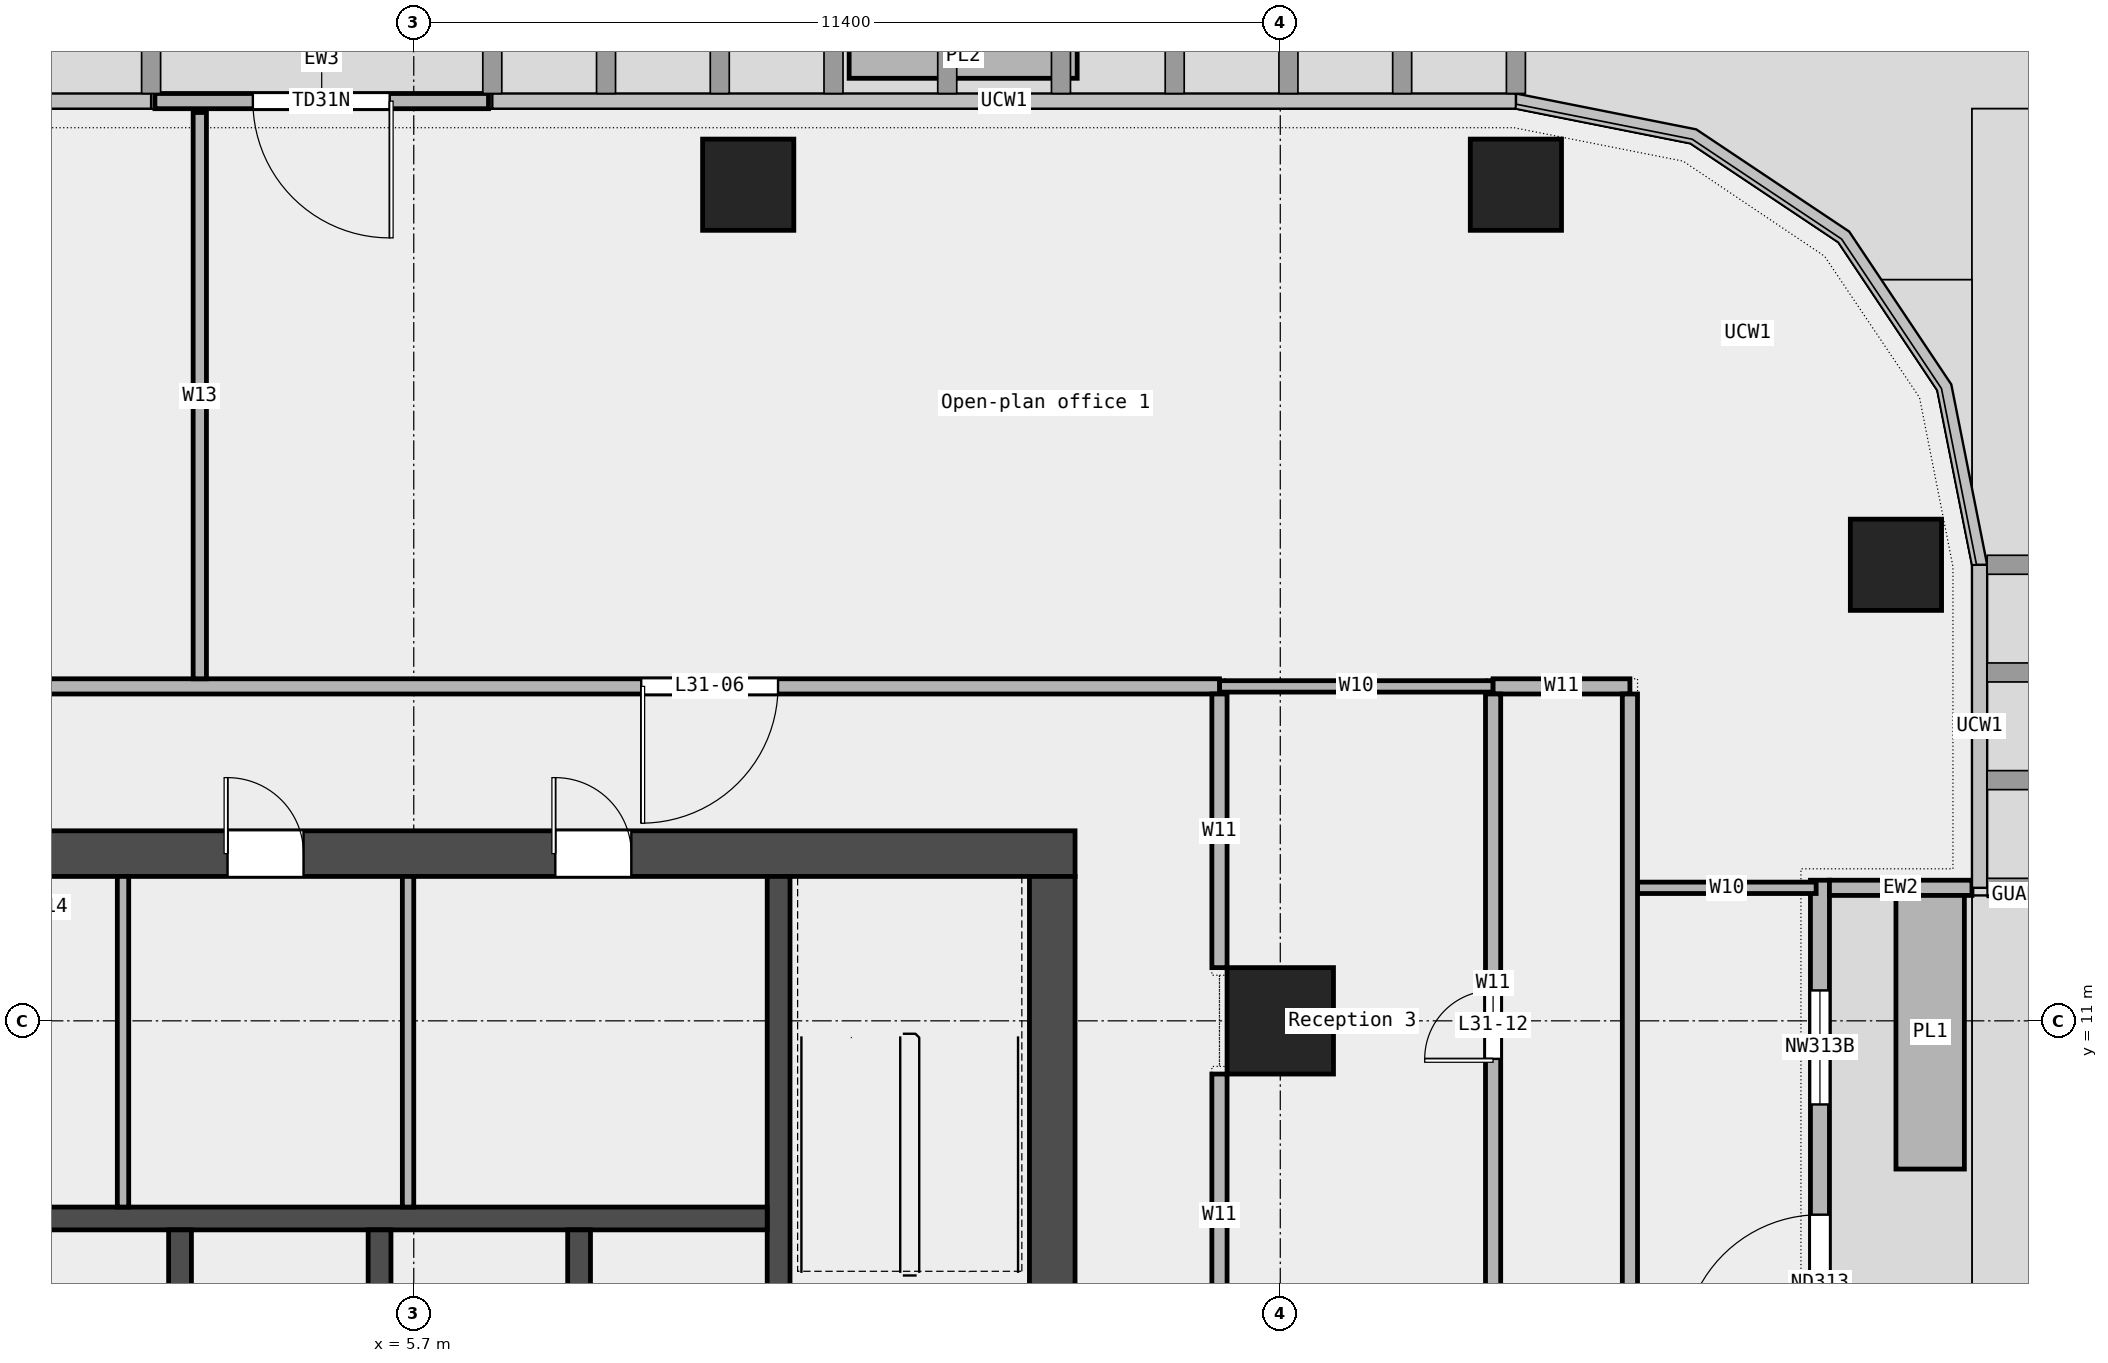
"""IFC4 building model, lengths in metres.
Left out: names, types, materials, properties, quantities, classifications, styles, units other than length and angle.
Written with IfcOpenShell. Run it as: python <this file> out.ifc"""

import sys

from ifc_helpers import new_model, si_unit, direction, frame, frame_2d, origin, origin_2d, place, context, subcontext, project, spatial, rectangle, extrude, element, fill, save


model = new_model("IFC4")
c1 = context("Model", 3, precision=1e-05, world=origin(), true_north=direction((0.0, 1.0)))
c2 = subcontext(c1, "Body", "Model", "MODEL_VIEW")
j1 = project(units=[si_unit("LENGTHUNIT", "METRE"), si_unit("PLANEANGLEUNIT", "RADIAN")], contexts=[c1])
p1 = place(None, origin())
s1 = spatial("IfcSite", under=j1, at=p1, CompositionType="ELEMENT")
p2 = place(p1, origin())
s2 = spatial("IfcBuilding", under=s1, at=p2, CompositionType="ELEMENT")
p3 = place(p2, frame((0.0, 0.0, 157.0)))
s3 = spatial("IfcBuildingStorey", under=s2, at=p3, CompositionType="ELEMENT", Elevation=157.0)
for number, where, z_axis, x_axis in (
    (1, (25.2, 17.0, 0.0), (0.0, 0.0, 1.0), (1.0, 0.0, 0.0)),
    (2, (20.2, 22.0, 0.0), (0.0, 0.0, 1.0), (1.0, 0.0, 0.0)),
    (3, (10.1, 22.0, 0.0), (0.0, 0.0, 1.0), (1.0, 0.0, 0.0)),
):
    element("IfcColumn", number, at=place(p3, frame(where, z_axis=z_axis, x_axis=x_axis)), inside=s3, PredefinedType="COLUMN", context=c2, shape_type="SweptSolid", body=[
        extrude(rectangle(XDim=1.2, YDim=1.2, at=origin_2d()), origin(), (0.0, 0.0, 1.0), 3.6),
    ])
p4 = place(p3, frame((17.1, 11.0, 0.0), z_axis=(0.0, 0.0, 1.0), x_axis=(1.0, 0.0, 0.0)))
e4 = element("IfcColumn", 4, at=p4, inside=s3, PredefinedType="COLUMN", context=c2, shape_type="SweptSolid", body=[
    extrude(rectangle(XDim=1.4, YDim=1.4, at=origin_2d()), origin(), (0.0, 0.0, 1.0), 3.6),
])
p5 = place(p3, frame((24.2, -0.1, 0.0), z_axis=(0.0, 0.0, 1.0), x_axis=(0.0, 1.0, 0.0)))
e5 = element("IfcWall", 5, at=p5, inside=s3, PredefinedType="STANDARD", context=c2, shape_type="SweptSolid", body=[
    extrude(rectangle(XDim=12.95, YDim=0.25, at=frame_2d((6.475, 0.0))), origin(), (0.0, 0.0, 1.0), 3.6),
])
p6 = place(p5, frame((1.5, 0.0, 0.45)))
e6 = element("IfcOpeningElement", 6, at=p6, cuts=e5, PredefinedType="OPENING", context=c2, shape_type="SweptSolid", body=[
    extrude(rectangle(XDim=1.5, YDim=2.4, at=frame_2d((0.75, 1.2))), frame((0.0, 0.137, 0.0), z_axis=(0.0, -1.0, 0.0), x_axis=(1.0, 0.0, 0.0)), (0.0, 0.0, 1.0), 0.274),
])
p7 = place(p5, frame((6.75, 0.0, 0.0)))
e7 = element("IfcOpeningElement", 7, at=p7, cuts=e5, PredefinedType="OPENING", context=c2, shape_type="SweptSolid", body=[
    extrude(rectangle(XDim=1.8, YDim=2.4, at=frame_2d((0.9, 1.2))), frame((0.0, 0.137, 0.0), z_axis=(0.0, -1.0, 0.0), x_axis=(1.0, 0.0, 0.0)), (0.0, 0.0, 1.0), 0.274),
])
p8 = place(p5, frame((10.0, 0.0, 0.45)))
e8 = element("IfcOpeningElement", 8, at=p8, cuts=e5, PredefinedType="OPENING", context=c2, shape_type="SweptSolid", body=[
    extrude(rectangle(XDim=1.5, YDim=2.4, at=frame_2d((0.75, 1.2))), frame((0.0, 0.137, 0.0), z_axis=(0.0, -1.0, 0.0), x_axis=(1.0, 0.0, 0.0)), (0.0, 0.0, 1.0), 0.274),
])
p9 = place(p3, frame((26.2, 12.75, 0.0), z_axis=(0.0, 0.0, 1.0), x_axis=(-1.0, 0.0, 0.0)))
e9 = element("IfcWall", 9, at=p9, inside=s3, PredefinedType="STANDARD", context=c2, shape_type="SweptSolid", body=[
    extrude(rectangle(XDim=1.875, YDim=0.2, at=frame_2d((0.938, 0.0))), origin(), (0.0, 0.0, 1.0), 3.6),
])
p10 = place(p3, frame((25.65, 9.05, 0.0), z_axis=(0.0, 0.0, 1.0), x_axis=(0.0, 1.0, 0.0)))
e10 = element("IfcWall", 10, at=p10, inside=s3, PredefinedType="STANDARD", context=c2, shape_type="SweptSolid", body=[
    extrude(rectangle(XDim=3.6, YDim=0.9, at=frame_2d((1.8, 0.0))), origin(), (0.0, 0.0, 1.0), 0.7),
])
p11 = place(p3, frame((6.683, 23.1, 0.0), z_axis=(0.0, 0.0, 1.0), x_axis=(-1.0, 0.0, 0.0)))
e11 = element("IfcWall", 11, at=p11, inside=s3, PredefinedType="STANDARD", context=c2, shape_type="SweptSolid", body=[
    extrude(rectangle(XDim=4.389, YDim=0.2, at=frame_2d((2.194, 0.0))), origin(), (0.0, 0.0, 1.0), 3.6),
])
p12 = place(p11, frame((1.3, 0.0, 0.0)))
e12 = element("IfcOpeningElement", 12, at=p12, cuts=e11, PredefinedType="OPENING", context=c2, shape_type="SweptSolid", body=[
    extrude(rectangle(XDim=1.8, YDim=2.4, at=frame_2d((0.9, 1.2))), frame((0.0, 0.112, 0.0), z_axis=(0.0, -1.0, 0.0), x_axis=(1.0, 0.0, 0.0)), (0.0, 0.0, 1.0), 0.224),
])
p13 = place(p3, frame((14.428, 23.7, 0.0), z_axis=(0.0, 0.0, 1.0), x_axis=(-1.0, 0.0, 0.0)))
e13 = element("IfcWall", 13, at=p13, inside=s3, PredefinedType="STANDARD", context=c2, shape_type="SweptSolid", body=[
    extrude(rectangle(XDim=3.0, YDim=0.6, at=frame_2d((1.5, 0.0))), origin(), (0.0, 0.0, 1.0), 0.7),
])
p14 = place(p3, frame((21.8, 12.75, 0.0), z_axis=(0.0, 0.0, 1.0), x_axis=(1.0, 0.0, 0.0)))
e14 = element("IfcWall", 14, at=p14, inside=s3, PredefinedType="PARTITIONING", context=c2, shape_type="SweptSolid", body=[
    extrude(rectangle(XDim=2.35, YDim=0.15, at=frame_2d((1.175, 0.0))), origin(), (0.0, 0.0, 1.0), 3.6),
])
p15 = place(p3, frame((16.3, 15.4, 0.0), z_axis=(0.0, 0.0, 1.0), x_axis=(1.0, 0.0, 0.0)))
e15 = element("IfcWall", 15, at=p15, inside=s3, PredefinedType="PARTITIONING", context=c2, shape_type="SweptSolid", body=[
    extrude(rectangle(XDim=3.6, YDim=0.15, at=frame_2d((1.8, 0.0))), origin(), (0.0, 0.0, 1.0), 3.6),
])
p16 = place(p3, frame((-16.3, 15.4, 0.0), z_axis=(0.0, 0.0, 1.0), x_axis=(1.0, 0.0, 0.0)))
e16 = element("IfcWall", 16, at=p16, inside=s3, PredefinedType="PARTITIONING", context=c2, shape_type="SweptSolid", body=[
    extrude(rectangle(XDim=32.6, YDim=0.2, at=frame_2d((16.3, 0.0))), origin(), (0.0, 0.0, 1.0), 3.6),
])
p17 = place(p16, frame((24.992, 0.0, 0.0)))
e17 = element("IfcOpeningElement", 17, at=p17, cuts=e16, PredefinedType="OPENING", context=c2, shape_type="SweptSolid", body=[
    extrude(rectangle(XDim=1.8, YDim=2.1, at=frame_2d((0.9, 1.05))), frame((0.0, 0.112, 0.0), z_axis=(0.0, -1.0, 0.0), x_axis=(1.0, 0.0, 0.0)), (0.0, 0.0, 1.0), 0.224),
])
p18 = place(p16, frame((9.635, 0.0, 0.0)))
e18 = element("IfcOpeningElement", 18, at=p18, cuts=e16, PredefinedType="OPENING", context=c2, shape_type="SweptSolid", body=[
    extrude(rectangle(XDim=1.8, YDim=2.1, at=frame_2d((0.9, 1.05))), frame((0.0, 0.112, 0.0), z_axis=(0.0, -1.0, 0.0), x_axis=(1.0, 0.0, 0.0)), (0.0, 0.0, 1.0), 0.224),
])
p19 = place(p3, frame((19.9, 15.4, 0.0), z_axis=(0.0, 0.0, 1.0), x_axis=(1.0, 0.0, 0.0)))
e19 = element("IfcWall", 19, at=p19, inside=s3, PredefinedType="PARTITIONING", context=c2, shape_type="SweptSolid", body=[
    extrude(rectangle(XDim=1.8, YDim=0.2, at=frame_2d((0.9, 0.0))), origin(), (0.0, 0.0, 1.0), 3.6),
])
p20 = place(p3, frame((2.885, 15.5, 0.0), z_axis=(0.0, 0.0, 1.0), x_axis=(0.0, 1.0, 0.0)))
e20 = element("IfcWall", 20, at=p20, inside=s3, PredefinedType="PARTITIONING", context=c2, shape_type="SweptSolid", body=[
    extrude(rectangle(XDim=7.45, YDim=0.175, at=frame_2d((3.725, 0.0))), origin(), (0.0, 0.0, 1.0), 3.6),
])
p21 = place(p3, frame((16.3, 6.6, 0.0), z_axis=(0.0, 0.0, 1.0), x_axis=(0.0, 1.0, 0.0)))
e21 = element("IfcWall", 21, at=p21, inside=s3, PredefinedType="PARTITIONING", context=c2, shape_type="SweptSolid", body=[
    extrude(rectangle(XDim=3.7, YDim=0.2, at=frame_2d((1.85, 0.0))), origin(), (0.0, 0.0, 1.0), 3.6),
])
p22 = place(p3, frame((16.3, 11.7, 0.0), z_axis=(0.0, 0.0, 1.0), x_axis=(0.0, 1.0, 0.0)))
e22 = element("IfcWall", 22, at=p22, inside=s3, PredefinedType="PARTITIONING", context=c2, shape_type="SweptSolid", body=[
    extrude(rectangle(XDim=3.6, YDim=0.2, at=frame_2d((1.8, 0.0))), origin(), (0.0, 0.0, 1.0), 3.6),
])
p23 = place(p3, frame((19.9, 6.6, 0.0), z_axis=(0.0, 0.0, 1.0), x_axis=(0.0, 1.0, 0.0)))
e23 = element("IfcWall", 23, at=p23, inside=s3, PredefinedType="PARTITIONING", context=c2, shape_type="SweptSolid", body=[
    extrude(rectangle(XDim=8.7, YDim=0.2, at=frame_2d((4.35, 0.0))), origin(), (0.0, 0.0, 1.0), 3.6),
])
p24 = place(p23, frame((3.9, 0.0, 0.0)))
e24 = element("IfcOpeningElement", 24, at=p24, cuts=e23, PredefinedType="OPENING", context=c2, shape_type="SweptSolid", body=[
    extrude(rectangle(XDim=0.9, YDim=2.1, at=frame_2d((0.45, 1.05))), frame((0.0, 0.112, 0.0), z_axis=(0.0, -1.0, 0.0), x_axis=(1.0, 0.0, 0.0)), (0.0, 0.0, 1.0), 0.224),
])
p25 = place(p3, frame((21.7, -9.0, 0.0), z_axis=(0.0, 0.0, 1.0), x_axis=(0.0, 1.0, 0.0)))
e25 = element("IfcWall", 25, at=p25, inside=s3, PredefinedType="PARTITIONING", context=c2, shape_type="SweptSolid", body=[
    extrude(rectangle(XDim=24.3, YDim=0.2, at=frame_2d((12.15, 0.0))), origin(), (0.0, 0.0, 1.0), 3.6),
])
p26 = place(p25, frame((14.925, 0.0, 0.0)))
e26 = element("IfcOpeningElement", 26, at=p26, cuts=e25, PredefinedType="OPENING", context=c2, shape_type="SweptSolid", body=[
    extrude(rectangle(XDim=0.9, YDim=2.1, at=frame_2d((0.45, 1.05))), frame((0.0, 0.112, 0.0), z_axis=(0.0, -1.0, 0.0), x_axis=(1.0, 0.0, 0.0)), (0.0, 0.0, 1.0), 0.224),
])
p27 = place(p25, frame((2.562, 0.0, 0.0)))
e27 = element("IfcOpeningElement", 27, at=p27, cuts=e25, PredefinedType="OPENING", context=c2, shape_type="SweptSolid", body=[
    extrude(rectangle(XDim=0.9, YDim=2.1, at=frame_2d((0.45, 1.05))), frame((0.0, 0.112, 0.0), z_axis=(0.0, -1.0, 0.0), x_axis=(1.0, 0.0, 0.0)), (0.0, 0.0, 1.0), 0.224),
])
p28 = place(p3, frame((-14.4, 13.2, 0.0), z_axis=(0.0, 0.0, 1.0), x_axis=(1.0, 0.0, 0.0)))
e28 = element("IfcWall", 28, at=p28, inside=s3, PredefinedType="SHEAR", context=c2, shape_type="SweptSolid", body=[
    extrude(rectangle(XDim=28.8, YDim=0.6, at=frame_2d((14.4, 0.0))), origin(), (0.0, 0.0, 1.0), 3.7),
])
p29 = place(p28, frame((4.9, 0.0, 0.0)))
e29 = element("IfcOpeningElement", 29, at=p29, cuts=e28, PredefinedType="OPENING", context=c2, shape_type="SweptSolid", body=[
    extrude(rectangle(XDim=1.0, YDim=2.1, at=frame_2d((0.5, 1.05))), frame((0.0, 0.312, 0.0), z_axis=(0.0, -1.0, 0.0), x_axis=(1.0, 0.0, 0.0)), (0.0, 0.0, 1.0), 0.624),
])
p30 = place(p28, frame((8.087, 0.0, 0.0)))
e30 = element("IfcOpeningElement", 30, at=p30, cuts=e28, PredefinedType="OPENING", context=c2, shape_type="SweptSolid", body=[
    extrude(rectangle(XDim=1.0, YDim=2.1, at=frame_2d((0.5, 1.05))), frame((0.0, 0.312, 0.0), z_axis=(0.0, -1.0, 0.0), x_axis=(1.0, 0.0, 0.0)), (0.0, 0.0, 1.0), 0.624),
])
p31 = place(p28, frame((12.775, 0.0, 0.0)))
e31 = element("IfcOpeningElement", 31, at=p31, cuts=e28, PredefinedType="OPENING", context=c2, shape_type="SweptSolid", body=[
    extrude(rectangle(XDim=1.0, YDim=2.1, at=frame_2d((0.5, 1.05))), frame((0.0, 0.312, 0.0), z_axis=(0.0, -1.0, 0.0), x_axis=(1.0, 0.0, 0.0)), (0.0, 0.0, 1.0), 0.624),
])
p32 = place(p28, frame((17.65, 0.0, 0.0)))
e32 = element("IfcOpeningElement", 32, at=p32, cuts=e28, PredefinedType="OPENING", context=c2, shape_type="SweptSolid", body=[
    extrude(rectangle(XDim=1.0, YDim=2.1, at=frame_2d((0.5, 1.05))), frame((0.0, 0.312, 0.0), z_axis=(0.0, -1.0, 0.0), x_axis=(1.0, 0.0, 0.0)), (0.0, 0.0, 1.0), 0.624),
])
p33 = place(p28, frame((21.962, 0.0, 0.0)))
e33 = element("IfcOpeningElement", 33, at=p33, cuts=e28, PredefinedType="OPENING", context=c2, shape_type="SweptSolid", body=[
    extrude(rectangle(XDim=1.0, YDim=2.1, at=frame_2d((0.5, 1.05))), frame((0.0, 0.312, 0.0), z_axis=(0.0, -1.0, 0.0), x_axis=(1.0, 0.0, 0.0)), (0.0, 0.0, 1.0), 0.624),
])
p34 = place(p3, frame((14.1, -6.6, 0.0), z_axis=(0.0, 0.0, 1.0), x_axis=(0.0, 1.0, 0.0)))
e34 = element("IfcWall", 34, at=p34, inside=s3, PredefinedType="SHEAR", context=c2, shape_type="SweptSolid", body=[
    extrude(rectangle(XDim=19.5, YDim=0.6, at=frame_2d((9.75, 0.0))), origin(), (0.0, 0.0, 1.0), 3.7),
])
p35 = place(p34, frame((9.3, 0.0, 0.0)))
e35 = element("IfcOpeningElement", 35, at=p35, cuts=e34, PredefinedType="OPENING", context=c2, shape_type="SweptSolid", body=[
    extrude(rectangle(XDim=1.8, YDim=2.1, at=frame_2d((0.9, 1.05))), frame((0.0, 0.312, 0.0), z_axis=(0.0, -1.0, 0.0), x_axis=(1.0, 0.0, 0.0)), (0.0, 0.0, 1.0), 0.624),
])
p36 = place(p3, frame((10.5, 5.25, 0.0), z_axis=(0.0, 0.0, 1.0), x_axis=(0.0, 1.0, 0.0)))
e36 = element("IfcWall", 36, at=p36, inside=s3, PredefinedType="SHEAR", context=c2, shape_type="SweptSolid", body=[
    extrude(rectangle(XDim=7.65, YDim=0.3, at=frame_2d((3.825, 0.0))), origin(), (0.0, 0.0, 1.0), 3.7),
])
p37 = place(p3, frame((-10.35, 8.4, 0.0), z_axis=(0.0, 0.0, 1.0), x_axis=(1.0, 0.0, 0.0)))
e37 = element("IfcWall", 37, at=p37, inside=s3, PredefinedType="SOLIDWALL", context=c2, shape_type="SweptSolid", body=[
    extrude(rectangle(XDim=20.7, YDim=0.3, at=frame_2d((10.35, 0.0))), origin(), (0.0, 0.0, 1.0), 3.7),
])
for number, where, z_axis, x_axis in (
    (38, (2.625, 5.55, 0.0), (0.0, 0.0, 1.0), (0.0, 1.0, 0.0)),
    (39, (5.25, 5.55, 0.0), (0.0, 0.0, 1.0), (0.0, 1.0, 0.0)),
    (40, (7.875, 5.55, 0.0), (0.0, 0.0, 1.0), (0.0, 1.0, 0.0)),
):
    element("IfcWall", number, at=place(p3, frame(where, z_axis=z_axis, x_axis=x_axis)), inside=s3, PredefinedType="SOLIDWALL", context=c2, shape_type="SweptSolid", body=[
        extrude(rectangle(XDim=2.7, YDim=0.3, at=frame_2d((1.35, 0.0))), origin(), (0.0, 0.0, 1.0), 3.7),
    ])
for number, where, z_axis, x_axis in (
    (41, (1.875, 8.55, 0.0), (0.0, 0.0, 1.0), (0.0, 1.0, 0.0)),
    (42, (5.625, 8.55, 0.0), (0.0, 0.0, 1.0), (0.0, 1.0, 0.0)),
):
    element("IfcWall", number, at=place(p3, frame(where, z_axis=z_axis, x_axis=x_axis)), inside=s3, PredefinedType="PARTITIONING", context=c2, shape_type="SweptSolid", body=[
        extrude(rectangle(XDim=4.35, YDim=0.15, at=frame_2d((2.175, 0.0))), origin(), (0.0, 0.0, 1.0), 3.7),
    ])
p38 = place(p7, origin())
e43 = element("IfcDoor", 43, at=p38, inside=s3, OperationType="DOUBLE_DOOR_SINGLE_SWING", PredefinedType="DOOR", context=c2, shape_type="SweptSolid", body=[
    extrude(rectangle(XDim=1.8, YDim=2.4, at=frame_2d((0.9, 1.2))), frame((0.0, 0.025, 0.0), z_axis=(0.0, -1.0, 0.0), x_axis=(1.0, 0.0, 0.0)), (0.0, 0.0, 1.0), 0.05),
])
fill(e7, e43)
p39 = place(p8, origin())
e44 = element("IfcWindow", 44, at=p39, inside=s3, PartitioningType="SINGLE_PANEL", PredefinedType="WINDOW", context=c2, shape_type="SweptSolid", body=[
    extrude(rectangle(XDim=1.5, YDim=2.4, at=frame_2d((0.75, 1.2))), frame((0.0, 0.03, 0.0), z_axis=(0.0, -1.0, 0.0), x_axis=(1.0, 0.0, 0.0)), (0.0, 0.0, 1.0), 0.06),
])
fill(e8, e44)
p40 = place(p12, origin())
e45 = element("IfcDoor", 45, at=p40, inside=s3, OperationType="DOUBLE_DOOR_SINGLE_SWING", PredefinedType="DOOR", context=c2, shape_type="SweptSolid", body=[
    extrude(rectangle(XDim=1.8, YDim=2.4, at=frame_2d((0.9, 1.2))), frame((0.0, 0.025, 0.0), z_axis=(0.0, -1.0, 0.0), x_axis=(1.0, 0.0, 0.0)), (0.0, 0.0, 1.0), 0.05),
])
fill(e12, e45)
p41 = place(p17, origin())
e46 = element("IfcDoor", 46, at=p41, inside=s3, OperationType="DOUBLE_DOOR_SINGLE_SWING", PredefinedType="DOOR", context=c2, shape_type="SweptSolid", body=[
    extrude(rectangle(XDim=1.8, YDim=2.1, at=frame_2d((0.9, 1.05))), frame((0.0, 0.025, 0.0), z_axis=(0.0, -1.0, 0.0), x_axis=(1.0, 0.0, 0.0)), (0.0, 0.0, 1.0), 0.05),
])
fill(e17, e46)
p42 = place(p24, origin())
e47 = element("IfcDoor", 47, at=p42, inside=s3, OperationType="SINGLE_SWING_LEFT", PredefinedType="DOOR", context=c2, shape_type="SweptSolid", body=[
    extrude(rectangle(XDim=0.9, YDim=2.1, at=frame_2d((0.45, 1.05))), frame((0.0, 0.025, 0.0), z_axis=(0.0, -1.0, 0.0), x_axis=(1.0, 0.0, 0.0)), (0.0, 0.0, 1.0), 0.05),
])
fill(e24, e47)
p43 = place(p32, origin())
e48 = element("IfcDoor", 48, at=p43, inside=s3, OperationType="SINGLE_SWING_LEFT", PredefinedType="DOOR", context=c2, shape_type="SweptSolid", body=[
    extrude(rectangle(XDim=1.0, YDim=2.1, at=frame_2d((0.5, 1.05))), frame((0.0, 0.025, 0.0), z_axis=(0.0, -1.0, 0.0), x_axis=(1.0, 0.0, 0.0)), (0.0, 0.0, 1.0), 0.05),
])
fill(e32, e48)
p44 = place(p33, origin())
e49 = element("IfcDoor", 49, at=p44, inside=s3, OperationType="SINGLE_SWING_LEFT", PredefinedType="DOOR", context=c2, shape_type="SweptSolid", body=[
    extrude(rectangle(XDim=1.0, YDim=2.1, at=frame_2d((0.5, 1.05))), frame((0.0, 0.025, 0.0), z_axis=(0.0, -1.0, 0.0), x_axis=(1.0, 0.0, 0.0)), (0.0, 0.0, 1.0), 0.05),
])
fill(e33, e49)
save(model, sys.argv[1])
